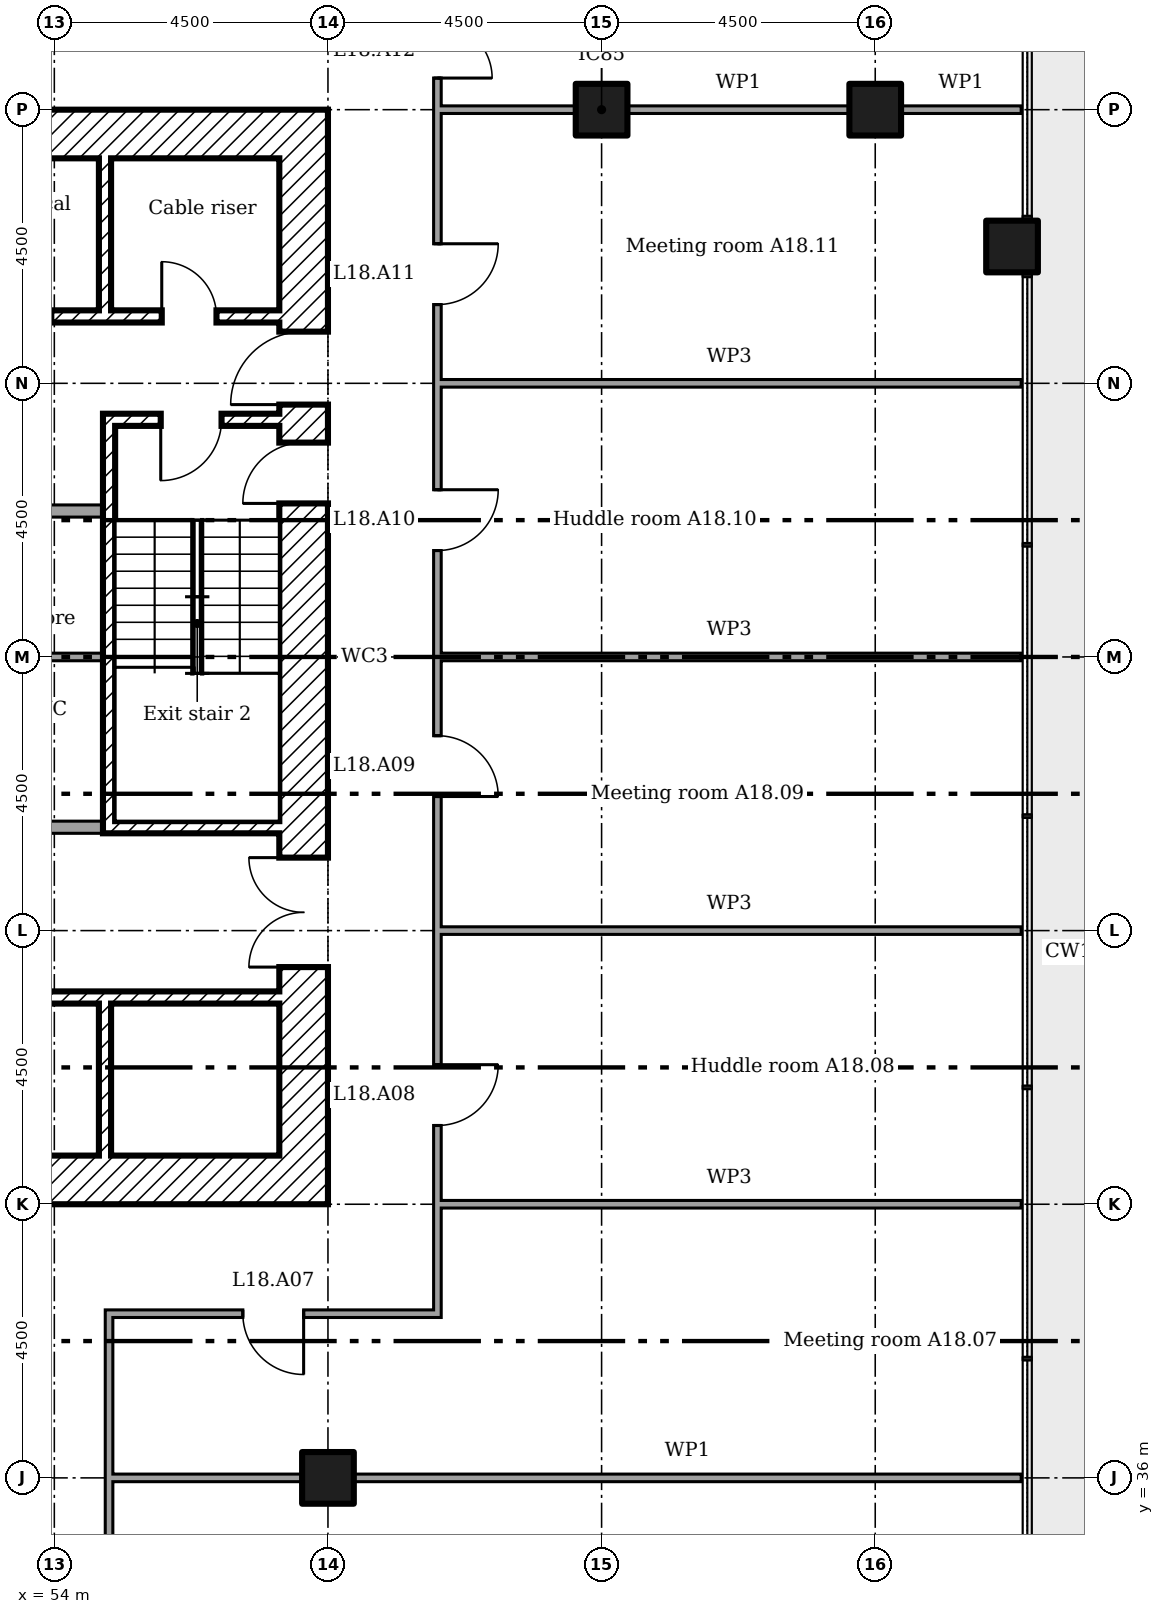
"""IFC4 building model, lengths in metres.
Left out: names, types, materials, properties, quantities, classifications, styles, units other than length and angle.
Written with IfcOpenShell. Run it as: python <this file> out.ifc"""

import sys

from ifc_helpers import new_model, si_unit, direction, frame, frame_2d, origin, origin_2d, place, context, subcontext, project, spatial, rectangle, extrude, element, fill, save


model = new_model("IFC4")
c1 = context("Model", 3, precision=1e-05, world=origin(), true_north=direction((0.0, 1.0)))
c2 = subcontext(c1, "Body", "Model", "MODEL_VIEW")
j1 = project(units=[si_unit("LENGTHUNIT", "METRE"), si_unit("PLANEANGLEUNIT", "RADIAN")], contexts=[c1])
p1 = place(None, origin())
s1 = spatial("IfcSite", under=j1, at=p1, CompositionType="ELEMENT")
p2 = place(p1, origin())
s2 = spatial("IfcBuilding", under=s1, at=p2, CompositionType="ELEMENT")
p3 = place(p2, frame((0.0, 0.0, 76.2)))
s3 = spatial("IfcBuildingStorey", under=s2, at=p3, CompositionType="ELEMENT", Elevation=76.2)
for number, where in (
    (1, (58.5, 36.0, 0.0)),
    (2, (63.0, 58.5, 0.0)),
    (3, (67.5, 58.5, 0.0)),
    (4, (69.75, 56.25, 0.0)),
):
    element("IfcColumn", number, at=place(p3, frame(where)), inside=s3, PredefinedType="COLUMN", context=c2, shape_type="SweptSolid", body=[
        extrude(rectangle(XDim=0.85, YDim=0.85, at=origin_2d()), origin(), (0.0, 0.0, 1.0), 3.6),
    ])
p4 = place(p3, frame((58.1, 40.5, 0.0), z_axis=(0.0, 0.0, 1.0), x_axis=(0.0, 1.0, 0.0)))
e5 = element("IfcWall", 5, at=p4, inside=s3, PredefinedType="SHEAR", context=c2, shape_type="SweptSolid", body=[
    extrude(rectangle(XDim=18.0, YDim=0.8, at=frame_2d((9.0, 0.0))), origin(), (0.0, 0.0, 1.0), 3.35),
])
p5 = place(p4, frame((13.15, 0.0, 0.0)))
e6 = element("IfcOpeningElement", 6, at=p5, cuts=e5, PredefinedType="OPENING", context=c2, shape_type="SweptSolid", body=[
    extrude(rectangle(XDim=1.2, YDim=2.1, at=frame_2d((0.6, 1.05))), frame((0.0, 0.41, 0.0), z_axis=(0.0, -1.0, 0.0), x_axis=(1.0, 0.0, 0.0)), (0.0, 0.0, 1.0), 0.82),
])
p6 = place(p4, frame((3.9, 0.0, 0.0)))
e7 = element("IfcOpeningElement", 7, at=p6, cuts=e5, PredefinedType="OPENING", context=c2, shape_type="SweptSolid", body=[
    extrude(rectangle(XDim=1.8, YDim=2.1, at=frame_2d((0.9, 1.05))), frame((0.0, 0.41, 0.0), z_axis=(0.0, -1.0, 0.0), x_axis=(1.0, 0.0, 0.0)), (0.0, 0.0, 1.0), 0.82),
])
p7 = place(p4, frame((11.525, 0.0, 0.0)))
e8 = element("IfcOpeningElement", 8, at=p7, cuts=e5, PredefinedType="OPENING", context=c2, shape_type="SweptSolid", body=[
    extrude(rectangle(XDim=1.0, YDim=2.1, at=frame_2d((0.5, 1.05))), frame((0.0, 0.41, 0.0), z_axis=(0.0, -1.0, 0.0), x_axis=(1.0, 0.0, 0.0)), (0.0, 0.0, 1.0), 0.82),
])
for number, where in (
    (9, (41.3, 58.1, 0.0)),
    (10, (41.3, 40.9, 0.0)),
):
    element("IfcWall", number, at=place(p3, frame(where)), inside=s3, PredefinedType="SHEAR", context=c2, shape_type="SweptSolid", body=[
        extrude(rectangle(XDim=16.4, YDim=0.8, at=frame_2d((8.2, 0.0))), origin(), (0.0, 0.0, 1.0), 3.35),
    ])
for number, where, z_axis, x_axis in (
    (11, (54.833, 57.7, 0.0), (0.0, 0.0, 1.0), (0.0, -1.0, 0.0)),
    (12, (54.833, 41.3, 0.0), (0.0, 0.0, 1.0), (0.0, 1.0, 0.0)),
):
    element("IfcWall", number, at=place(p3, frame(where, z_axis=z_axis, x_axis=x_axis)), inside=s3, PredefinedType="SHEAR", context=c2, shape_type="SweptSolid", body=[
        extrude(rectangle(XDim=2.5, YDim=0.2, at=frame_2d((1.25, 0.0))), origin(), (0.0, 0.0, 1.0), 3.35),
    ])
p8 = place(p3, frame((46.933, 55.1, 0.0)))
e13 = element("IfcWall", 13, at=p8, inside=s3, PredefinedType="SHEAR", context=c2, shape_type="SweptSolid", body=[
    extrude(rectangle(XDim=10.767, YDim=0.2, at=frame_2d((5.383, 0.0))), origin(), (0.0, 0.0, 1.0), 3.35),
])
p9 = place(p8, frame((8.833, 0.0, 0.0)))
e14 = element("IfcOpeningElement", 14, at=p9, cuts=e13, PredefinedType="OPENING", context=c2, shape_type="SweptSolid", body=[
    extrude(rectangle(XDim=0.9, YDim=2.1, at=frame_2d((0.45, 1.05))), frame((0.0, 0.11, 0.0), z_axis=(0.0, -1.0, 0.0), x_axis=(1.0, 0.0, 0.0)), (0.0, 0.0, 1.0), 0.22),
])
p10 = place(p8, frame((0.783, 0.0, 0.0)))
e15 = element("IfcOpeningElement", 15, at=p10, cuts=e13, PredefinedType="OPENING", context=c2, shape_type="SweptSolid", body=[
    extrude(rectangle(XDim=0.9, YDim=2.1, at=frame_2d((0.45, 1.05))), frame((0.0, 0.11, 0.0), z_axis=(0.0, -1.0, 0.0), x_axis=(1.0, 0.0, 0.0)), (0.0, 0.0, 1.0), 0.22),
])
p11 = place(p8, frame((3.45, 0.0, 0.0)))
e16 = element("IfcOpeningElement", 16, at=p11, cuts=e13, PredefinedType="OPENING", context=c2, shape_type="SweptSolid", body=[
    extrude(rectangle(XDim=0.9, YDim=2.1, at=frame_2d((0.45, 1.05))), frame((0.0, 0.11, 0.0), z_axis=(0.0, -1.0, 0.0), x_axis=(1.0, 0.0, 0.0)), (0.0, 0.0, 1.0), 0.22),
])
p12 = place(p8, frame((6.117, 0.0, 0.0)))
e17 = element("IfcOpeningElement", 17, at=p12, cuts=e13, PredefinedType="OPENING", context=c2, shape_type="SweptSolid", body=[
    extrude(rectangle(XDim=0.9, YDim=2.1, at=frame_2d((0.45, 1.05))), frame((0.0, 0.11, 0.0), z_axis=(0.0, -1.0, 0.0), x_axis=(1.0, 0.0, 0.0)), (0.0, 0.0, 1.0), 0.22),
])
p13 = place(p3, frame((41.3, 43.9, 0.0)))
e18 = element("IfcWall", 18, at=p13, inside=s3, PredefinedType="SHEAR", context=c2, shape_type="SweptSolid", body=[
    extrude(rectangle(XDim=16.4, YDim=0.2, at=frame_2d((8.2, 0.0))), origin(), (0.0, 0.0, 1.0), 3.35),
])
p14 = place(p13, frame((0.933, 0.0, 0.0)))
e19 = element("IfcOpeningElement", 19, at=p14, cuts=e18, PredefinedType="OPENING", context=c2, shape_type="SweptSolid", body=[
    extrude(rectangle(XDim=1.2, YDim=2.1, at=frame_2d((0.6, 1.05))), frame((0.0, 0.11, 0.0), z_axis=(0.0, -1.0, 0.0), x_axis=(1.0, 0.0, 0.0)), (0.0, 0.0, 1.0), 0.22),
])
p15 = place(p13, frame((3.6, 0.0, 0.0)))
e20 = element("IfcOpeningElement", 20, at=p15, cuts=e18, PredefinedType="OPENING", context=c2, shape_type="SweptSolid", body=[
    extrude(rectangle(XDim=1.2, YDim=2.1, at=frame_2d((0.6, 1.05))), frame((0.0, 0.11, 0.0), z_axis=(0.0, -1.0, 0.0), x_axis=(1.0, 0.0, 0.0)), (0.0, 0.0, 1.0), 0.22),
])
p16 = place(p13, frame((6.267, 0.0, 0.0)))
e21 = element("IfcOpeningElement", 21, at=p16, cuts=e18, PredefinedType="OPENING", context=c2, shape_type="SweptSolid", body=[
    extrude(rectangle(XDim=1.2, YDim=2.1, at=frame_2d((0.6, 1.05))), frame((0.0, 0.11, 0.0), z_axis=(0.0, -1.0, 0.0), x_axis=(1.0, 0.0, 0.0)), (0.0, 0.0, 1.0), 0.22),
])
p17 = place(p13, frame((8.933, 0.0, 0.0)))
e22 = element("IfcOpeningElement", 22, at=p17, cuts=e18, PredefinedType="OPENING", context=c2, shape_type="SweptSolid", body=[
    extrude(rectangle(XDim=1.2, YDim=2.1, at=frame_2d((0.6, 1.05))), frame((0.0, 0.11, 0.0), z_axis=(0.0, -1.0, 0.0), x_axis=(1.0, 0.0, 0.0)), (0.0, 0.0, 1.0), 0.22),
])
p18 = place(p3, frame((54.8, 53.4, 0.0)))
e23 = element("IfcWall", 23, at=p18, inside=s3, PredefinedType="SHEAR", context=c2, shape_type="SweptSolid", body=[
    extrude(rectangle(XDim=2.9, YDim=0.2, at=frame_2d((1.45, 0.0))), origin(), (0.0, 0.0, 1.0), 3.35),
])
p19 = place(p18, frame((0.95, 0.0, 0.0)))
e24 = element("IfcOpeningElement", 24, at=p19, cuts=e23, PredefinedType="OPENING", context=c2, shape_type="SweptSolid", body=[
    extrude(rectangle(XDim=1.0, YDim=2.1, at=frame_2d((0.5, 1.05))), frame((0.0, 0.11, 0.0), z_axis=(0.0, -1.0, 0.0), x_axis=(1.0, 0.0, 0.0)), (0.0, 0.0, 1.0), 0.22),
])
p20 = place(p3, frame((54.8, 46.7, 0.0)))
e25 = element("IfcWall", 25, at=p20, inside=s3, PredefinedType="SHEAR", context=c2, shape_type="SweptSolid", body=[
    extrude(rectangle(XDim=2.9, YDim=0.2, at=frame_2d((1.45, 0.0))), origin(), (0.0, 0.0, 1.0), 3.35),
])
p21 = place(p3, frame((54.9, 46.8, 0.0), z_axis=(0.0, 0.0, 1.0), x_axis=(0.0, 1.0, 0.0)))
e26 = element("IfcWall", 26, at=p21, inside=s3, PredefinedType="SHEAR", context=c2, shape_type="SweptSolid", body=[
    extrude(rectangle(XDim=6.5, YDim=0.2, at=frame_2d((3.25, 0.0))), origin(), (0.0, 0.0, 1.0), 3.35),
])
p22 = place(p3, frame((44.2, 51.9, 0.0)))
e27 = element("IfcWall", 27, at=p22, inside=s3, PredefinedType="PARTITIONING", context=c2, shape_type="SweptSolid", body=[
    extrude(rectangle(XDim=10.6, YDim=0.2, at=frame_2d((5.3, 0.0))), origin(), (0.0, 0.0, 1.0), 3.35),
])
p23 = place(p22, frame((8.45, 0.0, 0.0)))
e28 = element("IfcOpeningElement", 28, at=p23, cuts=e27, PredefinedType="OPENING", context=c2, shape_type="SweptSolid", body=[
    extrude(rectangle(XDim=0.9, YDim=2.1, at=frame_2d((0.45, 1.05))), frame((0.0, 0.11, 0.0), z_axis=(0.0, -1.0, 0.0), x_axis=(1.0, 0.0, 0.0)), (0.0, 0.0, 1.0), 0.22),
])
p24 = place(p3, frame((44.2, 46.7, 0.0)))
e29 = element("IfcWall", 29, at=p24, inside=s3, PredefinedType="PARTITIONING", context=c2, shape_type="SweptSolid", body=[
    extrude(rectangle(XDim=10.6, YDim=0.2, at=frame_2d((5.3, 0.0))), origin(), (0.0, 0.0, 1.0), 3.35),
])
p25 = place(p24, frame((1.4, 0.0, 0.0)))
e30 = element("IfcOpeningElement", 30, at=p25, cuts=e29, PredefinedType="OPENING", context=c2, shape_type="SweptSolid", body=[
    extrude(rectangle(XDim=0.9, YDim=2.1, at=frame_2d((0.45, 1.05))), frame((0.0, 0.11, 0.0), z_axis=(0.0, -1.0, 0.0), x_axis=(1.0, 0.0, 0.0)), (0.0, 0.0, 1.0), 0.22),
])
p26 = place(p24, frame((5.0, 0.0, 0.0)))
e31 = element("IfcOpeningElement", 31, at=p26, cuts=e29, PredefinedType="OPENING", context=c2, shape_type="SweptSolid", body=[
    extrude(rectangle(XDim=0.9, YDim=2.1, at=frame_2d((0.45, 1.05))), frame((0.0, 0.11, 0.0), z_axis=(0.0, -1.0, 0.0), x_axis=(1.0, 0.0, 0.0)), (0.0, 0.0, 1.0), 0.22),
])
p27 = place(p24, frame((8.45, 0.0, 0.0)))
e32 = element("IfcOpeningElement", 32, at=p27, cuts=e29, PredefinedType="OPENING", context=c2, shape_type="SweptSolid", body=[
    extrude(rectangle(XDim=0.9, YDim=2.1, at=frame_2d((0.45, 1.05))), frame((0.0, 0.11, 0.0), z_axis=(0.0, -1.0, 0.0), x_axis=(1.0, 0.0, 0.0)), (0.0, 0.0, 1.0), 0.22),
])
p28 = place(p3, frame((54.8, 49.5, 0.0), z_axis=(0.0, 0.0, 1.0), x_axis=(-1.0, 0.0, 0.0)))
e33 = element("IfcWall", 33, at=p28, inside=s3, PredefinedType="PARTITIONING", context=c2, shape_type="SweptSolid", body=[
    extrude(rectangle(XDim=3.338, YDim=0.125, at=frame_2d((1.669, 0.0))), origin(), (0.0, 0.0, 1.0), 3.35),
])
p29 = place(p3, frame((54.9, 36.0, 0.0)))
e34 = element("IfcWall", 34, at=p29, inside=s3, PredefinedType="PARTITIONING", context=c2, shape_type="SweptSolid", body=[
    extrude(rectangle(XDim=3.175, YDim=0.125, at=frame_2d((1.587, 0.0))), origin(), (0.0, 0.0, 1.0), 3.45),
])
p30 = place(p3, frame((58.925, 36.0, 0.0)))
e35 = element("IfcWall", 35, at=p30, inside=s3, PredefinedType="PARTITIONING", context=c2, shape_type="SweptSolid", body=[
    extrude(rectangle(XDim=10.975, YDim=0.125, at=frame_2d((5.487, 0.0))), origin(), (0.0, 0.0, 1.0), 2.766),
])
p31 = place(p3, frame((54.837, 38.7, 0.0)))
e36 = element("IfcWall", 36, at=p31, inside=s3, PredefinedType="PARTITIONING", context=c2, shape_type="SweptSolid", body=[
    extrude(rectangle(XDim=5.525, YDim=0.125, at=frame_2d((2.763, 0.0))), origin(), (0.0, 0.0, 1.0), 3.45),
])
p32 = place(p31, frame((2.262, 0.0, 0.0)))
e37 = element("IfcOpeningElement", 37, at=p32, cuts=e36, PredefinedType="OPENING", context=c2, shape_type="SweptSolid", body=[
    extrude(rectangle(XDim=1.0, YDim=2.1, at=frame_2d((0.5, 1.05))), frame((0.0, 0.073, 0.0), z_axis=(0.0, -1.0, 0.0), x_axis=(1.0, 0.0, 0.0)), (0.0, 0.0, 1.0), 0.145),
])
for number, where in (
    (38, (60.3, 40.5, 0.0)),
    (39, (60.3, 45.0, 0.0)),
    (40, (60.3, 49.5, 0.0)),
    (41, (60.3, 54.0, 0.0)),
):
    element("IfcWall", number, at=place(p3, frame(where)), inside=s3, PredefinedType="MOVABLE", context=c2, shape_type="SweptSolid", body=[
        extrude(rectangle(XDim=9.6, YDim=0.125, at=frame_2d((4.8, 0.0))), origin(), (0.0, 0.0, 1.0), 2.766),
    ])
p33 = place(p3, frame((60.3, 58.5, 0.0)))
e42 = element("IfcWall", 42, at=p33, inside=s3, PredefinedType="PARTITIONING", context=c2, shape_type="SweptSolid", body=[
    extrude(rectangle(XDim=2.275, YDim=0.125, at=frame_2d((1.137, 0.0))), origin(), (0.0, 0.0, 1.0), 2.676),
])
p34 = place(p3, frame((63.425, 58.5, 0.0)))
e43 = element("IfcWall", 43, at=p34, inside=s3, PredefinedType="PARTITIONING", context=c2, shape_type="SweptSolid", body=[
    extrude(rectangle(XDim=3.65, YDim=0.125, at=frame_2d((1.825, 0.0))), origin(), (0.0, 0.0, 1.0), 2.676),
])
p35 = place(p3, frame((67.925, 58.5, 0.0)))
e44 = element("IfcWall", 44, at=p35, inside=s3, PredefinedType="PARTITIONING", context=c2, shape_type="SweptSolid", body=[
    extrude(rectangle(XDim=1.975, YDim=0.125, at=frame_2d((0.987, 0.0))), origin(), (0.0, 0.0, 1.0), 2.676),
])
p36 = place(p3, frame((54.9, 29.1, 0.0), z_axis=(0.0, 0.0, 1.0), x_axis=(0.0, 1.0, 0.0)))
e45 = element("IfcWall", 45, at=p36, inside=s3, PredefinedType="PARTITIONING", context=c2, shape_type="SweptSolid", body=[
    extrude(rectangle(XDim=9.537, YDim=0.125, at=frame_2d((4.769, 0.0))), origin(), (0.0, 0.0, 1.0), 3.45),
])
p37 = place(p36, frame((3.825, 0.0, 0.0)))
e46 = element("IfcOpeningElement", 46, at=p37, cuts=e45, PredefinedType="OPENING", context=c2, shape_type="SweptSolid", body=[
    extrude(rectangle(XDim=1.0, YDim=2.1, at=frame_2d((0.5, 1.05))), frame((0.0, 0.073, 0.0), z_axis=(0.0, -1.0, 0.0), x_axis=(1.0, 0.0, 0.0)), (0.0, 0.0, 1.0), 0.145),
])
p38 = place(p3, frame((60.3, 38.762, 0.0), z_axis=(0.0, 0.0, 1.0), x_axis=(0.0, 1.0, 0.0)))
e47 = element("IfcWall", 47, at=p38, inside=s3, PredefinedType="PARTITIONING", context=c2, shape_type="SweptSolid", body=[
    extrude(rectangle(XDim=21.475, YDim=0.125, at=frame_2d((10.738, 0.0))), origin(), (0.0, 0.0, 1.0), 3.45),
])
p39 = place(p38, frame((3.032, 0.0, 0.0)))
e48 = element("IfcOpeningElement", 48, at=p39, cuts=e47, PredefinedType="OPENING", context=c2, shape_type="SweptSolid", body=[
    extrude(rectangle(XDim=1.0, YDim=2.1, at=frame_2d((0.5, 1.05))), frame((0.0, 0.073, 0.0), z_axis=(0.0, -1.0, 0.0), x_axis=(1.0, 0.0, 0.0)), (0.0, 0.0, 1.0), 0.145),
])
p40 = place(p38, frame((8.442, 0.0, 0.0)))
e49 = element("IfcOpeningElement", 49, at=p40, cuts=e47, PredefinedType="OPENING", context=c2, shape_type="SweptSolid", body=[
    extrude(rectangle(XDim=1.0, YDim=2.1, at=frame_2d((0.5, 1.05))), frame((0.0, 0.073, 0.0), z_axis=(0.0, -1.0, 0.0), x_axis=(1.0, 0.0, 0.0)), (0.0, 0.0, 1.0), 0.145),
])
p41 = place(p38, frame((12.488, 0.0, 0.0)))
e50 = element("IfcOpeningElement", 50, at=p41, cuts=e47, PredefinedType="OPENING", context=c2, shape_type="SweptSolid", body=[
    extrude(rectangle(XDim=1.0, YDim=2.1, at=frame_2d((0.5, 1.05))), frame((0.0, 0.073, 0.0), z_axis=(0.0, -1.0, 0.0), x_axis=(1.0, 0.0, 0.0)), (0.0, 0.0, 1.0), 0.145),
])
p42 = place(p38, frame((16.532, 0.0, 0.0)))
e51 = element("IfcOpeningElement", 51, at=p42, cuts=e47, PredefinedType="OPENING", context=c2, shape_type="SweptSolid", body=[
    extrude(rectangle(XDim=1.0, YDim=2.1, at=frame_2d((0.5, 1.05))), frame((0.0, 0.073, 0.0), z_axis=(0.0, -1.0, 0.0), x_axis=(1.0, 0.0, 0.0)), (0.0, 0.0, 1.0), 0.145),
])
p43 = place(p38, frame((20.258, 0.0, 0.0)))
e52 = element("IfcOpeningElement", 52, at=p43, cuts=e47, PredefinedType="OPENING", context=c2, shape_type="SweptSolid", body=[
    extrude(rectangle(XDim=0.9, YDim=2.1, at=frame_2d((0.45, 1.05))), frame((0.0, 0.073, 0.0), z_axis=(0.0, -1.0, 0.0), x_axis=(1.0, 0.0, 0.0)), (0.0, 0.0, 1.0), 0.145),
])
p44 = place(p5, origin())
e53 = element("IfcDoor", 53, at=p44, inside=s3, OperationType="SINGLE_SWING_RIGHT", PredefinedType="DOOR", context=c2, shape_type="SweptSolid", body=[
    extrude(rectangle(XDim=1.2, YDim=2.1, at=frame_2d((0.6, 1.05))), frame((0.0, 0.025, 0.0), z_axis=(0.0, -1.0, 0.0), x_axis=(1.0, 0.0, 0.0)), (0.0, 0.0, 1.0), 0.05),
])
fill(e6, e53)
p45 = place(p6, origin())
e54 = element("IfcDoor", 54, at=p45, inside=s3, OperationType="DOUBLE_DOOR_SINGLE_SWING", PredefinedType="DOOR", context=c2, shape_type="SweptSolid", body=[
    extrude(rectangle(XDim=1.8, YDim=2.1, at=frame_2d((0.9, 1.05))), frame((0.0, 0.025, 0.0), z_axis=(0.0, -1.0, 0.0), x_axis=(1.0, 0.0, 0.0)), (0.0, 0.0, 1.0), 0.05),
])
fill(e7, e54)
p46 = place(p19, frame((1.0, 0.0, 0.0), x_axis=(-1.0, 0.0, 0.0)))
e55 = element("IfcDoor", 55, at=p46, inside=s3, OperationType="SINGLE_SWING_LEFT", PredefinedType="DOOR", context=c2, shape_type="SweptSolid", body=[
    extrude(rectangle(XDim=1.0, YDim=2.1, at=frame_2d((0.5, 1.05))), frame((0.0, 0.025, 0.0), z_axis=(0.0, -1.0, 0.0), x_axis=(1.0, 0.0, 0.0)), (0.0, 0.0, 1.0), 0.05),
])
fill(e24, e55)
p47 = place(p7, origin())
e56 = element("IfcDoor", 56, at=p47, inside=s3, OperationType="SINGLE_SWING_RIGHT", PredefinedType="DOOR", context=c2, shape_type="SweptSolid", body=[
    extrude(rectangle(XDim=1.0, YDim=2.1, at=frame_2d((0.5, 1.05))), frame((0.0, 0.025, 0.0), z_axis=(0.0, -1.0, 0.0), x_axis=(1.0, 0.0, 0.0)), (0.0, 0.0, 1.0), 0.05),
])
fill(e8, e56)
p48 = place(p9, origin())
e57 = element("IfcDoor", 57, at=p48, inside=s3, OperationType="SINGLE_SWING_RIGHT", PredefinedType="DOOR", context=c2, shape_type="SweptSolid", body=[
    extrude(rectangle(XDim=0.9, YDim=2.1, at=frame_2d((0.45, 1.05))), frame((0.0, 0.025, 0.0), z_axis=(0.0, -1.0, 0.0), x_axis=(1.0, 0.0, 0.0)), (0.0, 0.0, 1.0), 0.05),
])
fill(e14, e57)
p49 = place(p32, frame((1.0, 0.0, 0.0), x_axis=(-1.0, 0.0, 0.0)))
e58 = element("IfcDoor", 58, at=p49, inside=s3, OperationType="SINGLE_SWING_RIGHT", PredefinedType="DOOR", context=c2, shape_type="SweptSolid", body=[
    extrude(rectangle(XDim=1.0, YDim=2.1, at=frame_2d((0.5, 1.05))), frame((0.0, 0.025, 0.0), z_axis=(0.0, -1.0, 0.0), x_axis=(1.0, 0.0, 0.0)), (0.0, 0.0, 1.0), 0.05),
])
fill(e37, e58)
p50 = place(p39, frame((1.0, 0.0, 0.0), x_axis=(-1.0, 0.0, 0.0)))
e59 = element("IfcDoor", 59, at=p50, inside=s3, OperationType="SINGLE_SWING_RIGHT", PredefinedType="DOOR", context=c2, shape_type="SweptSolid", body=[
    extrude(rectangle(XDim=1.0, YDim=2.1, at=frame_2d((0.5, 1.05))), frame((0.0, 0.025, 0.0), z_axis=(0.0, -1.0, 0.0), x_axis=(1.0, 0.0, 0.0)), (0.0, 0.0, 1.0), 0.05),
])
fill(e48, e59)
p51 = place(p40, frame((1.0, 0.0, 0.0), x_axis=(-1.0, 0.0, 0.0)))
e60 = element("IfcDoor", 60, at=p51, inside=s3, OperationType="SINGLE_SWING_LEFT", PredefinedType="DOOR", context=c2, shape_type="SweptSolid", body=[
    extrude(rectangle(XDim=1.0, YDim=2.1, at=frame_2d((0.5, 1.05))), frame((0.0, 0.025, 0.0), z_axis=(0.0, -1.0, 0.0), x_axis=(1.0, 0.0, 0.0)), (0.0, 0.0, 1.0), 0.05),
])
fill(e49, e60)
p52 = place(p41, frame((1.0, 0.0, 0.0), x_axis=(-1.0, 0.0, 0.0)))
e61 = element("IfcDoor", 61, at=p52, inside=s3, OperationType="SINGLE_SWING_RIGHT", PredefinedType="DOOR", context=c2, shape_type="SweptSolid", body=[
    extrude(rectangle(XDim=1.0, YDim=2.1, at=frame_2d((0.5, 1.05))), frame((0.0, 0.025, 0.0), z_axis=(0.0, -1.0, 0.0), x_axis=(1.0, 0.0, 0.0)), (0.0, 0.0, 1.0), 0.05),
])
fill(e50, e61)
p53 = place(p42, frame((1.0, 0.0, 0.0), x_axis=(-1.0, 0.0, 0.0)))
e62 = element("IfcDoor", 62, at=p53, inside=s3, OperationType="SINGLE_SWING_RIGHT", PredefinedType="DOOR", context=c2, shape_type="SweptSolid", body=[
    extrude(rectangle(XDim=1.0, YDim=2.1, at=frame_2d((0.5, 1.05))), frame((0.0, 0.025, 0.0), z_axis=(0.0, -1.0, 0.0), x_axis=(1.0, 0.0, 0.0)), (0.0, 0.0, 1.0), 0.05),
])
fill(e51, e62)
p54 = place(p43, frame((0.9, 0.0, 0.0), x_axis=(-1.0, 0.0, 0.0)))
e63 = element("IfcDoor", 63, at=p54, inside=s3, OperationType="SINGLE_SWING_LEFT", PredefinedType="DOOR", context=c2, shape_type="SweptSolid", body=[
    extrude(rectangle(XDim=0.9, YDim=2.1, at=frame_2d((0.45, 1.05))), frame((0.0, 0.025, 0.0), z_axis=(0.0, -1.0, 0.0), x_axis=(1.0, 0.0, 0.0)), (0.0, 0.0, 1.0), 0.05),
])
fill(e52, e63)
save(model, sys.argv[1])
